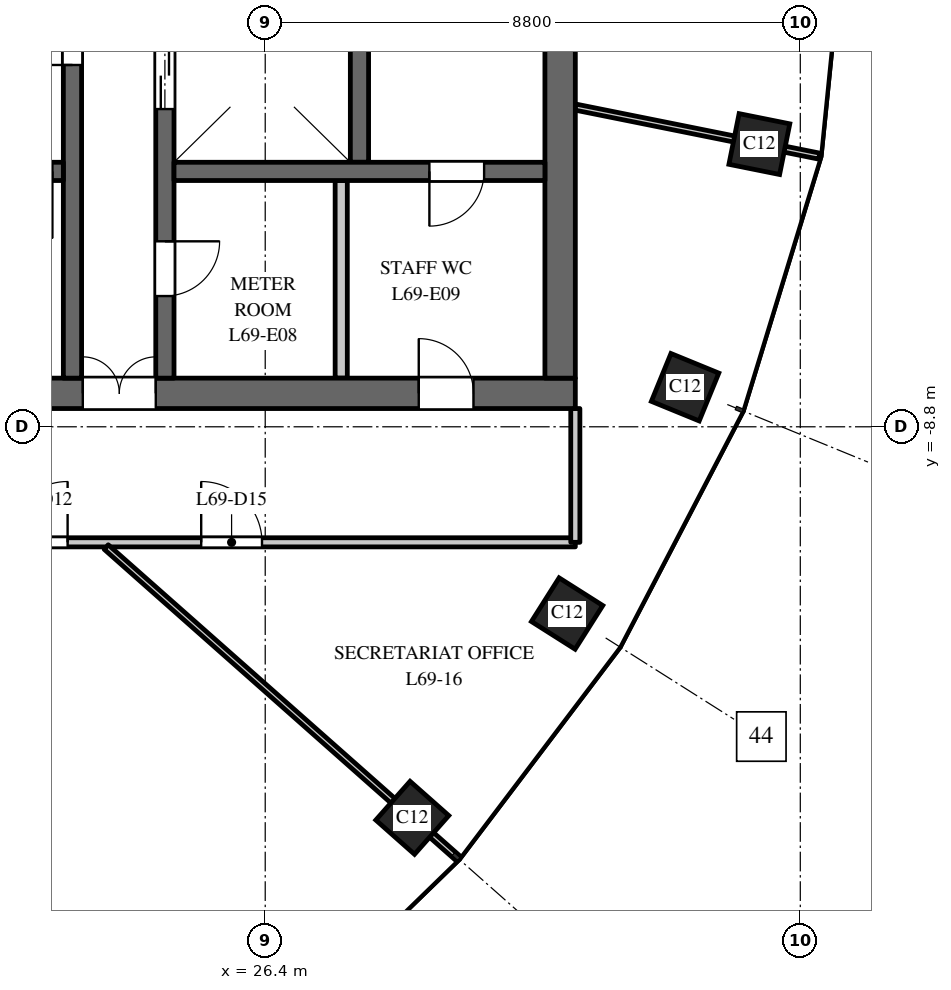
"""IFC4 building model, lengths in metres.
Left out: names, types, materials, properties, quantities, classifications, styles, units other than length and angle.
Written with IfcOpenShell. Run it as: python <this file> out.ifc"""

import sys

from ifc_helpers import new_model, si_unit, direction, frame, frame_2d, origin, origin_2d, place, context, subcontext, project, spatial, rectangle, extrude, element, fill, save


model = new_model("IFC4")
c1 = context("Model", 3, precision=1e-05, world=origin(), true_north=direction((0.0, 1.0)))
c2 = subcontext(c1, "Body", "Model", "MODEL_VIEW")
j1 = project(units=[si_unit("LENGTHUNIT", "METRE"), si_unit("PLANEANGLEUNIT", "RADIAN")], contexts=[c1])
p1 = place(None, origin())
s1 = spatial("IfcSite", under=j1, at=p1, CompositionType="ELEMENT")
p2 = place(p1, origin())
s2 = spatial("IfcBuilding", under=s1, at=p2, CompositionType="ELEMENT")
p3 = place(p2, frame((0.0, 0.0, 319.0)))
s3 = spatial("IfcBuildingStorey", under=s2, at=p3, CompositionType="ELEMENT", Elevation=319.0)
for number, where, z_axis, x_axis in (
    (1, (28.819, -15.23, 0.0), (0.0, 0.0, 1.0), (0.663, 0.749, 0.0)),
    (2, (31.365, -11.871, 0.0), (0.0, 0.0, 1.0), (0.535, 0.845, 0.0)),
    (3, (33.305, -8.149, 0.0), (0.0, 0.0, 1.0), (0.379, 0.925, 0.0)),
    (4, (34.527, -4.151, 0.0), (0.0, 0.0, 1.0), (0.197, 0.98, 0.0)),
):
    element("IfcColumn", number, at=place(p3, frame(where, z_axis=z_axis, x_axis=x_axis)), inside=s3, PredefinedType="COLUMN", context=c2, shape_type="SweptSolid", body=[
        extrude(rectangle(XDim=0.85, YDim=0.85, at=origin_2d()), origin(), (0.0, 0.0, 1.0), 4.0),
    ])
p4 = place(p3, frame((16.5, -8.25, 0.0), z_axis=(0.0, 0.0, 1.0), x_axis=(1.0, 0.0, 0.0)))
e5 = element("IfcWall", 5, at=p4, inside=s3, PredefinedType="SHEAR", context=c2, shape_type="SweptSolid", body=[
    extrude(rectangle(XDim=15.0, YDim=0.5, at=frame_2d((7.5, 0.0))), origin(), (0.0, 0.0, 1.0), 3.7),
])
p5 = place(p4, frame((6.9, 0.0, 0.0)))
e6 = element("IfcOpeningElement", 6, at=p5, cuts=e5, PredefinedType="OPENING", context=c2, shape_type="SweptSolid", body=[
    extrude(rectangle(XDim=1.2, YDim=2.1, at=frame_2d((0.6, 1.05))), frame((0.0, 0.26, 0.0), z_axis=(0.0, -1.0, 0.0), x_axis=(1.0, 0.0, 0.0)), (0.0, 0.0, 1.0), 0.52),
])
p6 = place(p4, frame((12.425, 0.0, 0.0)))
e7 = element("IfcOpeningElement", 7, at=p6, cuts=e5, PredefinedType="OPENING", context=c2, shape_type="SweptSolid", body=[
    extrude(rectangle(XDim=0.9, YDim=2.1, at=frame_2d((0.45, 1.05))), frame((0.0, 0.26, 0.0), z_axis=(0.0, -1.0, 0.0), x_axis=(1.0, 0.0, 0.0)), (0.0, 0.0, 1.0), 0.52),
])
p7 = place(p3, frame((27.95, -4.45, 0.0), z_axis=(0.0, 0.0, 1.0), x_axis=(0.0, 1.0, 0.0)))
e8 = element("IfcWall", 8, at=p7, inside=s3, PredefinedType="SHEAR", context=c2, shape_type="SweptSolid", body=[
    extrude(rectangle(XDim=5.8, YDim=0.3, at=frame_2d((2.9, 0.0))), origin(), (0.0, 0.0, 1.0), 3.7),
])
p8 = place(p3, frame((24.75, -8.0, 0.0), z_axis=(0.0, 0.0, 1.0), x_axis=(0.0, 1.0, 0.0)))
e9 = element("IfcWall", 9, at=p8, inside=s3, PredefinedType="SHEAR", context=c2, shape_type="SweptSolid", body=[
    extrude(rectangle(XDim=16.0, YDim=0.3, at=frame_2d((8.0, 0.0))), origin(), (0.0, 0.0, 1.0), 3.7),
])
p9 = place(p8, frame((4.425, 0.0, 0.0)))
e10 = element("IfcOpeningElement", 10, at=p9, cuts=e9, PredefinedType="OPENING", context=c2, shape_type="SweptSolid", body=[
    extrude(rectangle(XDim=1.1, YDim=2.1, at=frame_2d((0.55, 1.05))), frame((0.0, 0.16, 0.0), z_axis=(0.0, -1.0, 0.0), x_axis=(1.0, 0.0, 0.0)), (0.0, 0.0, 1.0), 0.32),
])
p10 = place(p8, frame((7.45, 0.0, 0.0)))
e11 = element("IfcOpeningElement", 11, at=p10, cuts=e9, PredefinedType="OPENING", context=c2, shape_type="SweptSolid", body=[
    extrude(rectangle(XDim=1.1, YDim=2.1, at=frame_2d((0.55, 1.05))), frame((0.0, 0.16, 0.0), z_axis=(0.0, -1.0, 0.0), x_axis=(1.0, 0.0, 0.0)), (0.0, 0.0, 1.0), 0.32),
])
p11 = place(p8, frame((10.575, 0.0, 0.0)))
e12 = element("IfcOpeningElement", 12, at=p11, cuts=e9, PredefinedType="OPENING", context=c2, shape_type="SweptSolid", body=[
    extrude(rectangle(XDim=0.9, YDim=2.1, at=frame_2d((0.45, 1.05))), frame((0.0, 0.16, 0.0), z_axis=(0.0, -1.0, 0.0), x_axis=(1.0, 0.0, 0.0)), (0.0, 0.0, 1.0), 0.32),
])
p12 = place(p8, frame((13.75, 0.0, 0.0)))
e13 = element("IfcOpeningElement", 13, at=p12, cuts=e9, PredefinedType="OPENING", context=c2, shape_type="SweptSolid", body=[
    extrude(rectangle(XDim=0.9, YDim=2.1, at=frame_2d((0.45, 1.05))), frame((0.0, 0.16, 0.0), z_axis=(0.0, -1.0, 0.0), x_axis=(1.0, 0.0, 0.0)), (0.0, 0.0, 1.0), 0.32),
])
p13 = place(p8, frame((1.35, 0.0, 0.0)))
e14 = element("IfcOpeningElement", 14, at=p13, cuts=e9, PredefinedType="OPENING", context=c2, shape_type="SweptSolid", body=[
    extrude(rectangle(XDim=0.9, YDim=2.1, at=frame_2d((0.45, 1.05))), frame((0.0, 0.16, 0.0), z_axis=(0.0, -1.0, 0.0), x_axis=(1.0, 0.0, 0.0)), (0.0, 0.0, 1.0), 0.32),
])
p14 = place(p3, frame((31.25, -8.0, 0.0), z_axis=(0.0, 0.0, 1.0), x_axis=(0.0, 1.0, 0.0)))
e15 = element("IfcWall", 15, at=p14, inside=s3, PredefinedType="SHEAR", context=c2, shape_type="SweptSolid", body=[
    extrude(rectangle(XDim=16.0, YDim=0.5, at=frame_2d((8.0, 0.0))), origin(), (0.0, 0.0, 1.0), 3.7),
])
p15 = place(p3, frame((27.65, -8.0, 0.0), z_axis=(0.0, 0.0, 1.0), x_axis=(0.0, 1.0, 0.0)))
e16 = element("IfcWall", 16, at=p15, inside=s3, PredefinedType="PARTITIONING", context=c2, shape_type="SweptSolid", body=[
    extrude(rectangle(XDim=3.25, YDim=0.2, at=frame_2d((1.625, 0.0))), origin(), (0.0, 0.0, 1.0), 3.7),
])
p16 = place(p3, frame((24.9, -4.6, 0.0), z_axis=(0.0, 0.0, 1.0), x_axis=(1.0, 0.0, 0.0)))
e17 = element("IfcWall", 17, at=p16, inside=s3, PredefinedType="SHEAR", context=c2, shape_type="SweptSolid", body=[
    extrude(rectangle(XDim=6.1, YDim=0.3, at=frame_2d((3.05, 0.0))), origin(), (0.0, 0.0, 1.0), 3.7),
])
p17 = place(p16, frame((4.2, 0.0, 0.0)))
e18 = element("IfcOpeningElement", 18, at=p17, cuts=e17, PredefinedType="OPENING", context=c2, shape_type="SweptSolid", body=[
    extrude(rectangle(XDim=0.9, YDim=2.1, at=frame_2d((0.45, 1.05))), frame((0.0, 0.16, 0.0), z_axis=(0.0, -1.0, 0.0), x_axis=(1.0, 0.0, 0.0)), (0.0, 0.0, 1.0), 0.32),
])
p18 = place(p3, frame((23.23, -8.0, 0.0), z_axis=(0.0, 0.0, 1.0), x_axis=(0.0, 1.0, 0.0)))
e19 = element("IfcWall", 19, at=p18, inside=s3, PredefinedType="SHEAR", context=c2, shape_type="SweptSolid", body=[
    extrude(rectangle(XDim=7.875, YDim=0.3, at=frame_2d((3.938, 0.0))), origin(), (0.0, 0.0, 1.0), 3.7),
])
p19 = place(p18, frame((5.15, 0.0, 0.0)))
e20 = element("IfcOpeningElement", 20, at=p19, cuts=e19, PredefinedType="OPENING", context=c2, shape_type="SweptSolid", body=[
    extrude(rectangle(XDim=1.1, YDim=2.1, at=frame_2d((0.55, 1.05))), frame((0.0, 0.16, 0.0), z_axis=(0.0, -1.0, 0.0), x_axis=(1.0, 0.0, 0.0)), (0.0, 0.0, 1.0), 0.32),
])
p20 = place(p3, frame((16.9, -4.6, 0.0), z_axis=(0.0, 0.0, 1.0), x_axis=(1.0, 0.0, 0.0)))
e21 = element("IfcWall", 21, at=p20, inside=s3, PredefinedType="SHEAR", context=c2, shape_type="SweptSolid", body=[
    extrude(rectangle(XDim=6.18, YDim=0.3, at=frame_2d((3.09, 0.0))), origin(), (0.0, 0.0, 1.0), 3.7),
])
p21 = place(p20, frame((4.9, 0.0, 0.0)))
e22 = element("IfcOpeningElement", 22, at=p21, cuts=e21, PredefinedType="OPENING", context=c2, shape_type="SweptSolid", body=[
    extrude(rectangle(XDim=1.1, YDim=2.1, at=frame_2d((0.55, 1.05))), frame((0.0, 0.16, 0.0), z_axis=(0.0, -1.0, 0.0), x_axis=(1.0, 0.0, 0.0)), (0.0, 0.0, 1.0), 0.32),
])
p22 = place(p3, frame((16.5, -10.7, 0.0), z_axis=(0.0, 0.0, 1.0), x_axis=(1.0, 0.0, 0.0)))
e23 = element("IfcWall", 23, at=p22, inside=s3, PredefinedType="PARTITIONING", context=c2, shape_type="SweptSolid", body=[
    extrude(rectangle(XDim=15.0, YDim=0.15, at=frame_2d((7.5, 0.0))), origin(), (0.0, 0.0, 1.0), 2.75),
])
p23 = place(p22, frame((5.65, 0.0, 0.0)))
e24 = element("IfcOpeningElement", 24, at=p23, cuts=e23, PredefinedType="OPENING", context=c2, shape_type="SweptSolid", body=[
    extrude(rectangle(XDim=1.0, YDim=2.1, at=frame_2d((0.5, 1.05))), frame((0.0, 0.085, 0.0), z_axis=(0.0, -1.0, 0.0), x_axis=(1.0, 0.0, 0.0)), (0.0, 0.0, 1.0), 0.17),
])
p24 = place(p22, frame((8.847, 0.0, 0.0)))
e25 = element("IfcOpeningElement", 25, at=p24, cuts=e23, PredefinedType="OPENING", context=c2, shape_type="SweptSolid", body=[
    extrude(rectangle(XDim=1.0, YDim=2.1, at=frame_2d((0.5, 1.05))), frame((0.0, 0.085, 0.0), z_axis=(0.0, -1.0, 0.0), x_axis=(1.0, 0.0, 0.0)), (0.0, 0.0, 1.0), 0.17),
])
p25 = place(p3, frame((23.785, -10.778, 0.0), z_axis=(0.0, 0.0, 1.0), x_axis=(0.748985701008, -0.662586160198, 0.0)))
e26 = element("IfcWall", 26, at=p25, inside=s3, PredefinedType="PARTITIONING", context=c2, shape_type="SweptSolid", body=[
    extrude(rectangle(XDim=7.723, YDim=0.1, at=frame_2d((3.861, 0.0))), origin(), (0.0, 0.0, 1.0), 2.75),
])
p26 = place(p3, frame((31.5, -10.7, 0.0), z_axis=(0.0, 0.0, 1.0), x_axis=(0.0, 1.0, 0.0)))
e27 = element("IfcWall", 27, at=p26, inside=s3, PredefinedType="PARTITIONING", context=c2, shape_type="SweptSolid", body=[
    extrude(rectangle(XDim=2.2, YDim=0.15, at=frame_2d((1.1, 0.0))), origin(), (0.0, 0.0, 1.0), 3.0),
])
p27 = place(p3, frame((31.5, -3.542, 0.0), z_axis=(0.0, 0.0, 1.0), x_axis=(0.980357474535, -0.197228857227, 0.0)))
e28 = element("IfcWall", 28, at=p27, inside=s3, PredefinedType="PARTITIONING", context=c2, shape_type="SweptSolid", body=[
    extrude(rectangle(XDim=4.092, YDim=0.1, at=frame_2d((2.046, 0.0))), origin(), (0.0, 0.0, 1.0), 3.0),
])
p28 = place(p9, origin())
e29 = element("IfcDoor", 29, at=p28, inside=s3, OperationType="DOUBLE_DOOR_SLIDING", PredefinedType="DOOR", context=c2, shape_type="SweptSolid", body=[
    extrude(rectangle(XDim=1.1, YDim=2.1, at=frame_2d((0.55, 1.05))), frame((0.0, 0.025, 0.0), z_axis=(0.0, -1.0, 0.0), x_axis=(1.0, 0.0, 0.0)), (0.0, 0.0, 1.0), 0.05),
])
fill(e10, e29)
p29 = place(p21, origin())
e30 = element("IfcDoor", 30, at=p29, inside=s3, OperationType="SINGLE_SWING_RIGHT", PredefinedType="DOOR", context=c2, shape_type="SweptSolid", body=[
    extrude(rectangle(XDim=1.1, YDim=2.1, at=frame_2d((0.55, 1.05))), frame((0.0, 0.025, 0.0), z_axis=(0.0, -1.0, 0.0), x_axis=(1.0, 0.0, 0.0)), (0.0, 0.0, 1.0), 0.05),
])
fill(e22, e30)
p30 = place(p19, origin())
e31 = element("IfcDoor", 31, at=p30, inside=s3, OperationType="SINGLE_SWING_RIGHT", PredefinedType="DOOR", context=c2, shape_type="SweptSolid", body=[
    extrude(rectangle(XDim=1.1, YDim=2.1, at=frame_2d((0.55, 1.05))), frame((0.0, 0.025, 0.0), z_axis=(0.0, -1.0, 0.0), x_axis=(1.0, 0.0, 0.0)), (0.0, 0.0, 1.0), 0.05),
])
fill(e20, e31)
p31 = place(p5, origin())
e32 = element("IfcDoor", 32, at=p31, inside=s3, OperationType="DOUBLE_DOOR_DOUBLE_SWING", PredefinedType="DOOR", context=c2, shape_type="SweptSolid", body=[
    extrude(rectangle(XDim=1.2, YDim=2.1, at=frame_2d((0.6, 1.05))), frame((0.0, 0.025, 0.0), z_axis=(0.0, -1.0, 0.0), x_axis=(1.0, 0.0, 0.0)), (0.0, 0.0, 1.0), 0.05),
])
fill(e6, e32)
p32 = place(p13, origin())
e33 = element("IfcDoor", 33, at=p32, inside=s3, OperationType="SINGLE_SWING_RIGHT", PredefinedType="DOOR", context=c2, shape_type="SweptSolid", body=[
    extrude(rectangle(XDim=0.9, YDim=2.1, at=frame_2d((0.45, 1.05))), frame((0.0, 0.025, 0.0), z_axis=(0.0, -1.0, 0.0), x_axis=(1.0, 0.0, 0.0)), (0.0, 0.0, 1.0), 0.05),
])
fill(e14, e33)
p33 = place(p6, origin())
e34 = element("IfcDoor", 34, at=p33, inside=s3, OperationType="SINGLE_SWING_RIGHT", PredefinedType="DOOR", context=c2, shape_type="SweptSolid", body=[
    extrude(rectangle(XDim=0.9, YDim=2.1, at=frame_2d((0.45, 1.05))), frame((0.0, 0.025, 0.0), z_axis=(0.0, -1.0, 0.0), x_axis=(1.0, 0.0, 0.0)), (0.0, 0.0, 1.0), 0.05),
])
fill(e7, e34)
p34 = place(p17, origin())
e35 = element("IfcDoor", 35, at=p34, inside=s3, OperationType="SINGLE_SWING_LEFT", PredefinedType="DOOR", context=c2, shape_type="SweptSolid", body=[
    extrude(rectangle(XDim=0.9, YDim=2.1, at=frame_2d((0.45, 1.05))), frame((0.0, 0.025, 0.0), z_axis=(0.0, -1.0, 0.0), x_axis=(1.0, 0.0, 0.0)), (0.0, 0.0, 1.0), 0.05),
])
fill(e18, e35)
p35 = place(p23, origin())
e36 = element("IfcDoor", 36, at=p35, inside=s3, OperationType="SINGLE_SWING_RIGHT", PredefinedType="DOOR", context=c2, shape_type="SweptSolid", body=[
    extrude(rectangle(XDim=1.0, YDim=2.1, at=frame_2d((0.5, 1.05))), frame((0.0, 0.025, 0.0), z_axis=(0.0, -1.0, 0.0), x_axis=(1.0, 0.0, 0.0)), (0.0, 0.0, 1.0), 0.05),
])
fill(e24, e36)
p36 = place(p24, origin())
e37 = element("IfcDoor", 37, at=p36, inside=s3, OperationType="SINGLE_SWING_LEFT", PredefinedType="DOOR", context=c2, shape_type="SweptSolid", body=[
    extrude(rectangle(XDim=1.0, YDim=2.1, at=frame_2d((0.5, 1.05))), frame((0.0, 0.025, 0.0), z_axis=(0.0, -1.0, 0.0), x_axis=(1.0, 0.0, 0.0)), (0.0, 0.0, 1.0), 0.05),
])
fill(e25, e37)
save(model, sys.argv[1])
